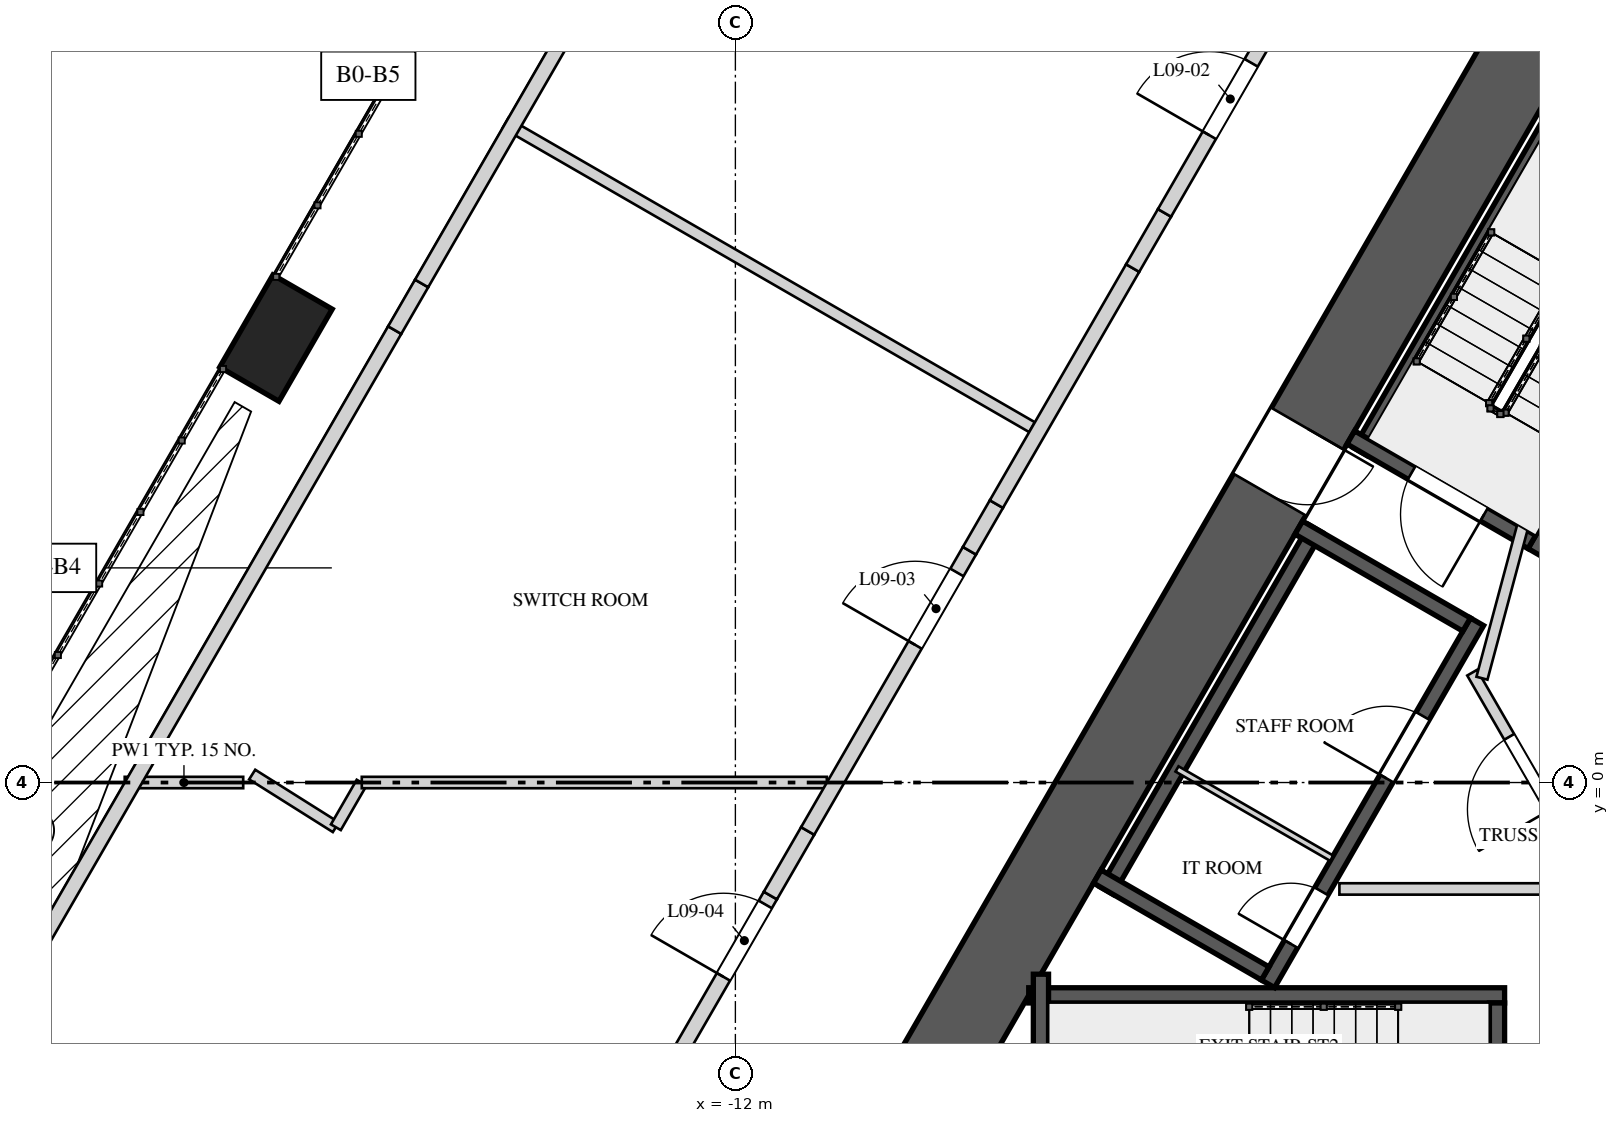
"""IFC4 building model, lengths in metres.
Left out: names, types, materials, properties, quantities, classifications, styles, units other than length and angle.
Written with IfcOpenShell. Run it as: python <this file> out.ifc"""

import sys

from ifc_helpers import new_model, si_unit, direction, frame, frame_2d, origin, origin_2d, place, context, subcontext, project, spatial, rectangle, extrude, element, fill, save


model = new_model("IFC4")
c1 = context("Model", 3, precision=1e-05, world=origin(), true_north=direction((0.0, 1.0)))
c2 = subcontext(c1, "Body", "Model", "MODEL_VIEW")
j1 = project(units=[si_unit("LENGTHUNIT", "METRE"), si_unit("PLANEANGLEUNIT", "RADIAN")], contexts=[c1])
p1 = place(None, origin())
s1 = spatial("IfcSite", under=j1, at=p1, CompositionType="ELEMENT")
p2 = place(p1, origin())
s2 = spatial("IfcBuilding", under=s1, at=p2, CompositionType="ELEMENT")
p3 = place(p2, frame((0.0, 0.0, 46.0)))
s3 = spatial("IfcBuildingStorey", under=s2, at=p3, CompositionType="ELEMENT", Elevation=46.0)
p4 = place(p3, frame((-1.126, 10.45, 0.0), z_axis=(0.0, 0.0, 1.0), x_axis=(-0.500001757713, -0.866024388966, 0.0)))
e1 = element("IfcWall", 1, at=p4, inside=s3, PredefinedType="SHEAR", context=c2, shape_type="SweptSolid", body=[
    extrude(rectangle(XDim=16.974, YDim=1.1, at=frame_2d((8.487, 0.0))), origin(), (0.0, 0.0, 1.0), 5.2),
])
p5 = place(p4, frame((6.692, 0.0, 0.0)))
e2 = element("IfcOpeningElement", 2, at=p5, cuts=e1, PredefinedType="OPENING", context=c2, shape_type="SweptSolid", body=[
    extrude(rectangle(XDim=1.0, YDim=2.4, at=frame_2d((0.5, 1.2))), frame((0.0, 0.56, 0.0), z_axis=(0.0, -1.0, 0.0), x_axis=(1.0, 0.0, 0.0)), (0.0, 0.0, 1.0), 1.12),
])
p6 = place(p3, frame((-18.044, 5.846, 0.0), z_axis=(0.0, 0.0, 1.0), x_axis=(-0.5, -0.866025403784, 0.0)))
e3 = element("IfcColumn", 3, at=p6, inside=s3, PredefinedType="COLUMN", context=c2, shape_type="SweptSolid", body=[
    extrude(rectangle(XDim=1.4, YDim=0.9, at=origin_2d()), origin(), (0.0, 0.0, 1.0), 2.898),
])
p7 = place(p3, frame((-0.68, 9.722, 0.0), z_axis=(0.0, 0.0, 1.0), x_axis=(-0.49998037582, -0.866036733513, 0.0)))
e4 = element("IfcWall", 4, at=p7, inside=s3, PredefinedType="SOLIDWALL", context=c2, shape_type="SweptSolid", body=[
    extrude(rectangle(XDim=6.2, YDim=0.2, at=frame_2d((3.1, 0.0))), origin(), (0.0, 0.0, 1.0), 4.85),
])
p8 = place(p3, frame((1.646, 8.45, 0.0), z_axis=(0.0, 0.0, 1.0), x_axis=(-0.500006002103, -0.866021938441, 0.0)))
e5 = element("IfcWall", 5, at=p8, inside=s3, PredefinedType="SOLIDWALL", context=c2, shape_type="SweptSolid", body=[
    extrude(rectangle(XDim=6.261, YDim=0.2, at=frame_2d((3.13, 0.0))), origin(), (0.0, 0.0, 1.0), 4.85),
])
p9 = place(p3, frame((-1.521, 3.165, 0.0), z_axis=(0.0, 0.0, 1.0), x_axis=(-0.866027397988, 0.499996545922, 0.0)))
e6 = element("IfcWall", 6, at=p9, inside=s3, PredefinedType="SOLIDWALL", context=c2, shape_type="SweptSolid", body=[
    extrude(rectangle(XDim=2.75, YDim=0.2, at=frame_2d((1.375, 0.0))), origin(), (0.0, 0.0, 1.0), 4.85),
])
p10 = place(p9, frame((0.725, 0.0, 0.0)))
e7 = element("IfcOpeningElement", 7, at=p10, cuts=e6, PredefinedType="OPENING", context=c2, shape_type="SweptSolid", body=[
    extrude(rectangle(XDim=1.1, YDim=2.4, at=frame_2d((0.55, 1.2))), frame((0.0, 0.11, 0.0), z_axis=(0.0, -1.0, 0.0), x_axis=(1.0, 0.0, 0.0)), (0.0, 0.0, 1.0), 0.22),
])
p11 = place(p3, frame((-8.141, -2.8, 0.0), z_axis=(0.0, 0.0, 1.0), x_axis=(1.0, 0.0, 0.0)))
e8 = element("IfcWall", 8, at=p11, inside=s3, PredefinedType="SOLIDWALL", context=c2, shape_type="SweptSolid", body=[
    extrude(rectangle(XDim=6.261, YDim=0.2, at=frame_2d((3.13, 0.0))), origin(), (0.0, 0.0, 1.0), 4.85),
])
p12 = place(p3, frame((-7.98, -2.522, 0.0), z_axis=(0.0, 0.0, 1.0), x_axis=(0.0, -1.0, 0.0)))
e9 = element("IfcWall", 9, at=p12, inside=s3, PredefinedType="SOLIDWALL", context=c2, shape_type="SweptSolid", body=[
    extrude(rectangle(XDim=3.128, YDim=0.2, at=frame_2d((1.564, 0.0))), origin(), (0.0, 0.0, 1.0), 4.85),
])
p13 = place(p3, frame((-1.98, -2.9, 0.0), z_axis=(0.0, 0.0, 1.0), x_axis=(0.0, -1.0, 0.0)))
e10 = element("IfcWall", 10, at=p13, inside=s3, PredefinedType="SOLIDWALL", context=c2, shape_type="SweptSolid", body=[
    extrude(rectangle(XDim=2.75, YDim=0.2, at=frame_2d((1.375, 0.0))), origin(), (0.0, 0.0, 1.0), 4.85),
])
p14 = place(p13, frame((0.725, 0.0, 0.0)))
e11 = element("IfcOpeningElement", 11, at=p14, cuts=e10, PredefinedType="OPENING", context=c2, shape_type="SweptSolid", body=[
    extrude(rectangle(XDim=1.1, YDim=2.4, at=frame_2d((0.55, 1.2))), frame((0.0, 0.11, 0.0), z_axis=(0.0, -1.0, 0.0), x_axis=(1.0, 0.0, 0.0)), (0.0, 0.0, 1.0), 0.22),
])
p15 = place(p3, frame((-4.993, -2.648, 0.0), z_axis=(0.0, 0.0, 1.0), x_axis=(0.499996545922, 0.866027397988, 0.0)))
e12 = element("IfcWall", 12, at=p15, inside=s3, PredefinedType="SOLIDWALL", context=c2, shape_type="SweptSolid", body=[
    extrude(rectangle(XDim=5.5, YDim=0.2, at=frame_2d((2.75, 0.0))), origin(), (0.0, 0.0, 1.0), 4.85),
])
p16 = place(p15, frame((3.12, 0.0, 0.0)))
e13 = element("IfcOpeningElement", 13, at=p16, cuts=e12, PredefinedType="OPENING", context=c2, shape_type="SweptSolid", body=[
    extrude(rectangle(XDim=0.95, YDim=2.4, at=frame_2d((0.475, 1.2))), frame((0.0, 0.11, 0.0), z_axis=(0.0, -1.0, 0.0), x_axis=(1.0, 0.0, 0.0)), (0.0, 0.0, 1.0), 0.22),
])
p17 = place(p15, frame((0.605, 0.0, 0.0)))
e14 = element("IfcOpeningElement", 14, at=p17, cuts=e12, PredefinedType="OPENING", context=c2, shape_type="SweptSolid", body=[
    extrude(rectangle(XDim=0.8, YDim=2.1, at=frame_2d((0.4, 1.05))), frame((0.0, 0.11, 0.0), z_axis=(0.0, -1.0, 0.0), x_axis=(1.0, 0.0, 0.0)), (0.0, 0.0, 1.0), 0.22),
])
p18 = place(p3, frame((-4.365, 3.34, 0.0), z_axis=(0.0, 0.0, 1.0), x_axis=(-0.499996545922, -0.866027397988, 0.0)))
e15 = element("IfcWall", 15, at=p18, inside=s3, PredefinedType="SOLIDWALL", context=c2, shape_type="SweptSolid", body=[
    extrude(rectangle(XDim=5.5, YDim=0.2, at=frame_2d((2.75, 0.0))), origin(), (0.0, 0.0, 1.0), 4.85),
])
for number, where, z_axis, x_axis in (
    (16, (-2.38, 2.078, 0.0), (0.0, 0.0, 1.0), (-0.866, 0.5, 0.0)),
    (17, (-5.03, -2.512, 0.0), (0.0, 0.0, 1.0), (-0.866, 0.5, 0.0)),
):
    element("IfcWall", number, at=place(p3, frame(where, z_axis=z_axis, x_axis=x_axis)), inside=s3, PredefinedType="SOLIDWALL", context=c2, shape_type="SweptSolid", body=[
        extrude(rectangle(XDim=2.55, YDim=0.2, at=frame_2d((1.275, 0.0))), origin(), (0.0, 0.0, 1.0), 4.85),
    ])
p19 = place(p3, frame((-4.155, -0.996, 0.0), z_axis=(0.0, 0.0, 1.0), x_axis=(-0.866016039709, 0.500016218704, 0.0)))
e18 = element("IfcWall", 18, at=p19, inside=s3, PredefinedType="PARTITIONING", context=c2, shape_type="SweptSolid", body=[
    extrude(rectangle(XDim=2.35, YDim=0.08, at=frame_2d((1.175, 0.0))), origin(), (0.0, 0.0, 1.0), 4.85),
])
p20 = place(p3, frame((-0.744, -1.261, 0.0), z_axis=(0.0, 0.0, 1.0), x_axis=(-0.500004234368, 0.866022959057, 0.0)))
e19 = element("IfcWall", 19, at=p20, inside=s3, PredefinedType="PARTITIONING", context=c2, shape_type="SweptSolid", body=[
    extrude(rectangle(XDim=3.125, YDim=0.15, at=frame_2d((1.562, 0.0))), origin(), (0.0, 0.0, 1.0), 4.85),
])
p21 = place(p20, frame((1.05, 0.0, 0.0)))
e20 = element("IfcOpeningElement", 20, at=p21, cuts=e19, PredefinedType="OPENING", context=c2, shape_type="SweptSolid", body=[
    extrude(rectangle(XDim=1.1, YDim=2.4, at=frame_2d((0.55, 1.2))), frame((0.0, 0.085, 0.0), z_axis=(0.0, -1.0, 0.0), x_axis=(1.0, 0.0, 0.0)), (0.0, 0.0, 1.0), 0.17),
])
p22 = place(p3, frame((-2.178, 1.372, 0.0), z_axis=(0.0, 0.0, 1.0), x_axis=(0.258808958833, 0.96592852884, 0.0)))
e21 = element("IfcWall", 21, at=p22, inside=s3, PredefinedType="PARTITIONING", context=c2, shape_type="SweptSolid", body=[
    extrude(rectangle(XDim=2.903, YDim=0.15, at=frame_2d((1.451, 0.0))), origin(), (0.0, 0.0, 1.0), 4.85),
])
p23 = place(p3, frame((-1.51, 4.215, 0.0), z_axis=(0.0, 0.0, 1.0), x_axis=(0.866085525409, 0.49989585183, 0.0)))
e22 = element("IfcWall", 22, at=p23, inside=s3, PredefinedType="PARTITIONING", context=c2, shape_type="SweptSolid", body=[
    extrude(rectangle(XDim=1.3, YDim=0.15, at=frame_2d((0.65, 0.0))), origin(), (0.0, 0.0, 1.0), 4.85),
])
p24 = place(p3, frame((-4.053, -1.4, 0.0), z_axis=(0.0, 0.0, 1.0), x_axis=(1.0, 0.0, 0.0)))
e23 = element("IfcWall", 23, at=p24, inside=s3, PredefinedType="PARTITIONING", context=c2, shape_type="SweptSolid", body=[
    extrude(rectangle(XDim=7.876, YDim=0.15, at=frame_2d((3.938, 0.0))), origin(), (0.0, 0.0, 1.0), 4.85),
])
p25 = place(p3, frame((-18.475, 0.0, 0.0), z_axis=(0.0, 0.0, 1.0), x_axis=(-1.0, 0.0, 0.0)))
e24 = element("IfcWall", 24, at=p25, inside=s3, PredefinedType="PARTITIONING", context=c2, shape_type="SweptSolid", body=[
    extrude(rectangle(XDim=1.559, YDim=0.15, at=frame_2d((0.779, 0.0))), origin(), (0.0, 0.0, 1.0), 4.85),
])
p26 = place(p3, frame((-17.256, -0.588, 0.0), z_axis=(0.0, 0.0, 1.0), x_axis=(-0.846148217584, 0.532947646471, 0.0)))
e25 = element("IfcWall", 25, at=p26, inside=s3, PredefinedType="PARTITIONING", context=c2, shape_type="SweptSolid", body=[
    extrude(rectangle(XDim=1.301, YDim=0.15, at=frame_2d((0.65, 0.0))), origin(), (0.0, 0.0, 1.0), 4.85),
])
p27 = place(p3, frame((-16.917, -0.001, 0.0), z_axis=(0.0, 0.0, 1.0), x_axis=(-0.499971721724, -0.866041729639, 0.0)))
e26 = element("IfcWall", 26, at=p27, inside=s3, PredefinedType="PARTITIONING", context=c2, shape_type="SweptSolid", body=[
    extrude(rectangle(XDim=0.678, YDim=0.15, at=frame_2d((0.339, 0.0))), origin(), (0.0, 0.0, 1.0), 4.85),
])
p28 = place(p3, frame((-10.796, 0.0, 0.0), z_axis=(0.0, 0.0, 1.0), x_axis=(-1.0, 0.0, 0.0)))
e27 = element("IfcWall", 27, at=p28, inside=s3, PredefinedType="PARTITIONING", context=c2, shape_type="SweptSolid", body=[
    extrude(rectangle(XDim=6.119, YDim=0.15, at=frame_2d((3.06, 0.0))), origin(), (0.0, 0.0, 1.0), 4.85),
])
p29 = place(p3, frame((-8.097, 4.675, 0.0), z_axis=(0.0, 0.0, 1.0), x_axis=(-0.866018381195, 0.500012163284, 0.0)))
e28 = element("IfcWall", 28, at=p29, inside=s3, PredefinedType="PARTITIONING", context=c2, shape_type="SweptSolid", body=[
    extrude(rectangle(XDim=8.0, YDim=0.15, at=frame_2d((4.0, 0.0))), origin(), (0.0, 0.0, 1.0), 4.85),
])
p30 = place(p3, frame((-13.135, -4.25, 0.0), z_axis=(0.0, 0.0, 1.0), x_axis=(0.50003154259, 0.866007191896, 0.0)))
e29 = element("IfcWall", 29, at=p30, inside=s3, PredefinedType="SOLIDWALL", context=c2, shape_type="SweptSolid", body=[
    extrude(rectangle(XDim=3.191, YDim=0.2, at=frame_2d((1.595, 0.0))), origin(), (0.0, 0.0, 1.0), 4.85),
])
p31 = place(p30, frame((1.956, 0.0, 0.0)))
e30 = element("IfcOpeningElement", 30, at=p31, cuts=e29, PredefinedType="OPENING", context=c2, shape_type="SweptSolid", body=[
    extrude(rectangle(XDim=1.1, YDim=2.2, at=frame_2d((0.55, 1.1))), frame((0.0, 0.11, 0.0), z_axis=(0.0, -1.0, 0.0), x_axis=(1.0, 0.0, 0.0)), (0.0, 0.0, 1.0), 0.22),
])
p32 = place(p3, frame((-11.539, -1.487, 0.0), z_axis=(0.0, 0.0, 1.0), x_axis=(0.499966601515, 0.86604468555, 0.0)))
e31 = element("IfcWall", 31, at=p32, inside=s3, PredefinedType="SOLIDWALL", context=c2, shape_type="SweptSolid", body=[
    extrude(rectangle(XDim=0.981, YDim=0.2, at=frame_2d((0.49, 0.0))), origin(), (0.0, 0.0, 1.0), 3.95),
])
p33 = place(p3, frame((-11.049, -0.637, 0.0), z_axis=(0.0, 0.0, 1.0), x_axis=(0.500000470374, 0.866025132214, 0.0)))
e32 = element("IfcWall", 32, at=p33, inside=s3, PredefinedType="SOLIDWALL", context=c2, shape_type="SweptSolid", body=[
    extrude(rectangle(XDim=4.257, YDim=0.2, at=frame_2d((2.128, 0.0))), origin(), (0.0, 0.0, 1.0), 4.85),
])
p34 = place(p33, frame((2.827, 0.0, 0.0)))
e33 = element("IfcOpeningElement", 33, at=p34, cuts=e32, PredefinedType="OPENING", context=c2, shape_type="SweptSolid", body=[
    extrude(rectangle(XDim=1.1, YDim=2.2, at=frame_2d((0.55, 1.1))), frame((0.0, 0.11, 0.0), z_axis=(0.0, -1.0, 0.0), x_axis=(1.0, 0.0, 0.0)), (0.0, 0.0, 1.0), 0.22),
])
p35 = place(p3, frame((-8.92, 3.049, 0.0), z_axis=(0.0, 0.0, 1.0), x_axis=(0.499881507708, 0.866093804534, 0.0)))
e34 = element("IfcWall", 34, at=p35, inside=s3, PredefinedType="SOLIDWALL", context=c2, shape_type="SweptSolid", body=[
    extrude(rectangle(XDim=0.709, YDim=0.2, at=frame_2d((0.354, 0.0))), origin(), (0.0, 0.0, 1.0), 4.15),
])
p36 = place(p3, frame((-8.566, 3.663, 0.0), z_axis=(0.0, 0.0, 1.0), x_axis=(0.500013241293, 0.866017758786, 0.0)))
e35 = element("IfcWall", 35, at=p36, inside=s3, PredefinedType="SOLIDWALL", context=c2, shape_type="SweptSolid", body=[
    extrude(rectangle(XDim=3.585, YDim=0.2, at=frame_2d((1.793, 0.0))), origin(), (0.0, 0.0, 1.0), 4.85),
])
p37 = place(p3, frame((-6.773, 6.768, 0.0), z_axis=(0.0, 0.0, 1.0), x_axis=(0.500117447933, 0.865957584569, 0.0)))
e36 = element("IfcWall", 36, at=p37, inside=s3, PredefinedType="SOLIDWALL", context=c2, shape_type="SweptSolid", body=[
    extrude(rectangle(XDim=0.838, YDim=0.2, at=frame_2d((0.419, 0.0))), origin(), (0.0, 0.0, 1.0), 3.95),
])
p38 = place(p3, frame((-6.354, 7.494, 0.0), z_axis=(0.0, 0.0, 1.0), x_axis=(0.499964529649, 0.866045881633, 0.0)))
e37 = element("IfcWall", 37, at=p38, inside=s3, PredefinedType="SOLIDWALL", context=c2, shape_type="SweptSolid", body=[
    extrude(rectangle(XDim=2.794, YDim=0.2, at=frame_2d((1.397, 0.0))), origin(), (0.0, 0.0, 1.0), 4.85),
])
p39 = place(p38, frame((1.18, 0.0, 0.0)))
e38 = element("IfcOpeningElement", 38, at=p39, cuts=e37, PredefinedType="OPENING", context=c2, shape_type="SweptSolid", body=[
    extrude(rectangle(XDim=1.1, YDim=2.2, at=frame_2d((0.55, 1.1))), frame((0.0, 0.11, 0.0), z_axis=(0.0, -1.0, 0.0), x_axis=(1.0, 0.0, 0.0)), (0.0, 0.0, 1.0), 0.22),
])
p40 = place(p3, frame((-22.372, -4.25, 0.0), z_axis=(0.0, 0.0, 1.0), x_axis=(0.500004108169, 0.866023031919, 0.0)))
e39 = element("IfcWall", 39, at=p40, inside=s3, PredefinedType="SOLIDWALL", context=c2, shape_type="SweptSolid", body=[
    extrude(rectangle(XDim=11.78, YDim=0.2, at=frame_2d((5.89, 0.0))), origin(), (0.0, 0.0, 1.0), 4.85),
])
p41 = place(p3, frame((-16.482, 5.952, 0.0), z_axis=(0.0, 0.0, 1.0), x_axis=(0.499881507708, 0.866093804534, 0.0)))
e40 = element("IfcWall", 40, at=p41, inside=s3, PredefinedType="SOLIDWALL", context=c2, shape_type="SweptSolid", body=[
    extrude(rectangle(XDim=0.709, YDim=0.2, at=frame_2d((0.354, 0.0))), origin(), (0.0, 0.0, 1.0), 4.15),
])
p42 = place(p3, frame((-16.128, 6.566, 0.0), z_axis=(0.0, 0.0, 1.0), x_axis=(0.500008815681, 0.866020313989, 0.0)))
e41 = element("IfcWall", 41, at=p42, inside=s3, PredefinedType="SOLIDWALL", context=c2, shape_type="SweptSolid", body=[
    extrude(rectangle(XDim=7.355, YDim=0.2, at=frame_2d((3.678, 0.0))), origin(), (0.0, 0.0, 1.0), 4.85),
])
p43 = place(p10, origin())
e42 = element("IfcDoor", 42, at=p43, inside=s3, OperationType="SINGLE_SWING_RIGHT", PredefinedType="DOOR", context=c2, shape_type="SweptSolid", body=[
    extrude(rectangle(XDim=1.1, YDim=2.4, at=frame_2d((0.55, 1.2))), frame((0.0, 0.025, 0.0), z_axis=(0.0, -1.0, 0.0), x_axis=(1.0, 0.0, 0.0)), (0.0, 0.0, 1.0), 0.05),
])
fill(e7, e42)
p44 = place(p16, origin())
e43 = element("IfcDoor", 43, at=p44, inside=s3, OperationType="SINGLE_SWING_LEFT", PredefinedType="DOOR", context=c2, shape_type="SweptSolid", body=[
    extrude(rectangle(XDim=0.95, YDim=2.4, at=frame_2d((0.475, 1.2))), frame((0.0, 0.025, 0.0), z_axis=(0.0, -1.0, 0.0), x_axis=(1.0, 0.0, 0.0)), (0.0, 0.0, 1.0), 0.05),
])
fill(e13, e43)
p45 = place(p17, origin())
e44 = element("IfcDoor", 44, at=p45, inside=s3, OperationType="SINGLE_SWING_RIGHT", PredefinedType="DOOR", context=c2, shape_type="SweptSolid", body=[
    extrude(rectangle(XDim=0.8, YDim=2.1, at=frame_2d((0.4, 1.05))), frame((0.0, 0.025, 0.0), z_axis=(0.0, -1.0, 0.0), x_axis=(1.0, 0.0, 0.0)), (0.0, 0.0, 1.0), 0.05),
])
fill(e14, e44)
p46 = place(p21, origin())
e45 = element("IfcDoor", 45, at=p46, inside=s3, OperationType="SINGLE_SWING_LEFT", PredefinedType="DOOR", context=c2, shape_type="SweptSolid", body=[
    extrude(rectangle(XDim=1.1, YDim=2.4, at=frame_2d((0.55, 1.2))), frame((0.0, 0.025, 0.0), z_axis=(0.0, -1.0, 0.0), x_axis=(1.0, 0.0, 0.0)), (0.0, 0.0, 1.0), 0.05),
])
fill(e20, e45)
p47 = place(p5, origin())
e46 = element("IfcDoor", 46, at=p47, inside=s3, OperationType="SINGLE_SWING_RIGHT", PredefinedType="DOOR", context=c2, shape_type="SweptSolid", body=[
    extrude(rectangle(XDim=1.0, YDim=2.4, at=frame_2d((0.5, 1.2))), frame((0.0, 0.025, 0.0), z_axis=(0.0, -1.0, 0.0), x_axis=(1.0, 0.0, 0.0)), (0.0, 0.0, 1.0), 0.05),
])
fill(e2, e46)
p48 = place(p39, origin())
e47 = element("IfcDoor", 47, at=p48, inside=s3, OperationType="SINGLE_SWING_RIGHT", PredefinedType="DOOR", context=c2, shape_type="SweptSolid", body=[
    extrude(rectangle(XDim=1.1, YDim=2.2, at=frame_2d((0.55, 1.1))), frame((0.0, 0.025, 0.0), z_axis=(0.0, -1.0, 0.0), x_axis=(1.0, 0.0, 0.0)), (0.0, 0.0, 1.0), 0.05),
])
fill(e38, e47)
p49 = place(p34, origin())
e48 = element("IfcDoor", 48, at=p49, inside=s3, OperationType="SINGLE_SWING_LEFT", PredefinedType="DOOR", context=c2, shape_type="SweptSolid", body=[
    extrude(rectangle(XDim=1.1, YDim=2.2, at=frame_2d((0.55, 1.1))), frame((0.0, 0.025, 0.0), z_axis=(0.0, -1.0, 0.0), x_axis=(1.0, 0.0, 0.0)), (0.0, 0.0, 1.0), 0.05),
])
fill(e33, e48)
p50 = place(p31, origin())
e49 = element("IfcDoor", 49, at=p50, inside=s3, OperationType="SINGLE_SWING_RIGHT", PredefinedType="DOOR", context=c2, shape_type="SweptSolid", body=[
    extrude(rectangle(XDim=1.1, YDim=2.2, at=frame_2d((0.55, 1.1))), frame((0.0, 0.025, 0.0), z_axis=(0.0, -1.0, 0.0), x_axis=(1.0, 0.0, 0.0)), (0.0, 0.0, 1.0), 0.05),
])
fill(e30, e49)
save(model, sys.argv[1])
